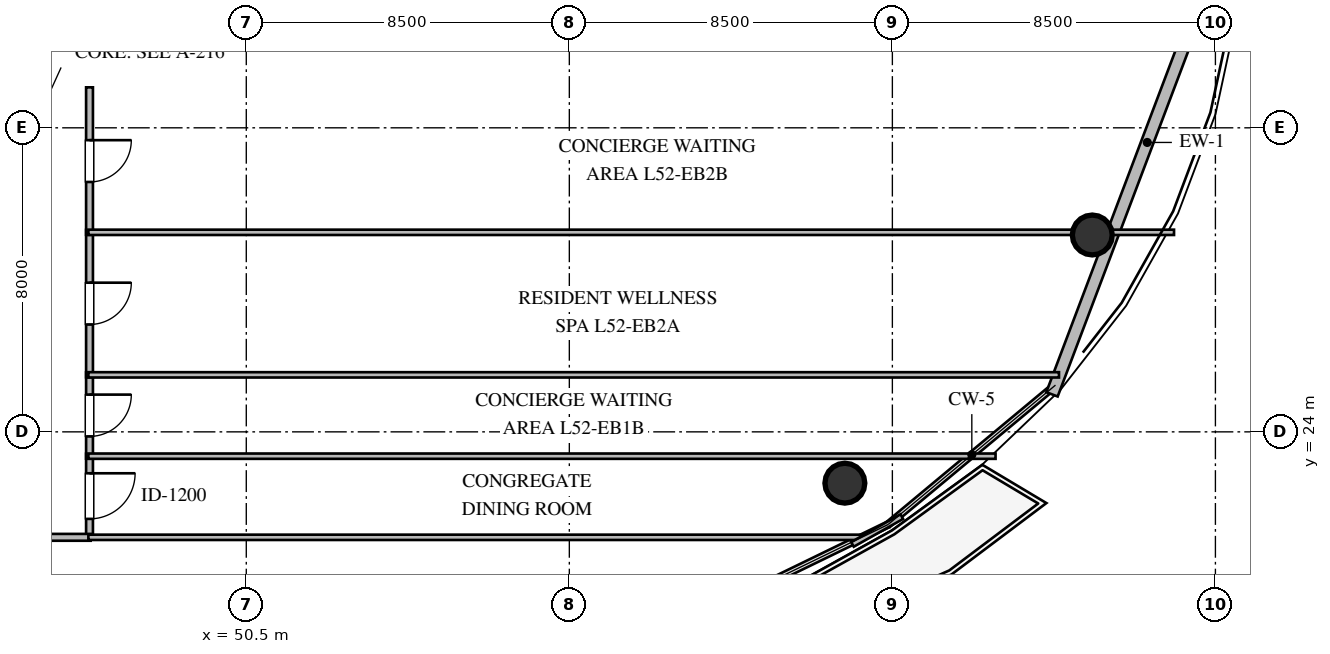
"""IFC4 building model, lengths in metres.
Left out: names, types, materials, properties, quantities, classifications, styles, units other than length and angle.
Written with IfcOpenShell. Run it as: python <this file> out.ifc"""

import sys

from ifc_helpers import new_model, si_unit, direction, frame, frame_2d, origin, origin_2d, place, context, subcontext, project, spatial, rectangle, circle, extrude, element, fill, save


model = new_model("IFC4")
c1 = context("Model", 3, precision=1e-05, world=origin(), true_north=direction((0.0, 1.0)))
c2 = subcontext(c1, "Body", "Model", "MODEL_VIEW")
j1 = project(units=[si_unit("LENGTHUNIT", "METRE"), si_unit("PLANEANGLEUNIT", "RADIAN")], contexts=[c1])
p1 = place(None, origin())
s1 = spatial("IfcSite", under=j1, at=p1, CompositionType="ELEMENT")
p2 = place(p1, origin())
s2 = spatial("IfcBuilding", under=s1, at=p2, CompositionType="ELEMENT")
p3 = place(p2, frame((0.0, 0.0, 199.2)))
s3 = spatial("IfcBuildingStorey", under=s2, at=p3, CompositionType="ELEMENT", Elevation=199.2)
for number, where, z_axis, x_axis in (
    (1, (66.25, 22.65, 0.0), (0.0, 0.0, 1.0), (1.0, 0.0, 0.0)),
    (2, (72.76, 29.18, 0.0), (0.0, 0.0, 1.0), (1.0, 0.0, 0.0)),
):
    element("IfcColumn", number, at=place(p3, frame(where, z_axis=z_axis, x_axis=x_axis)), inside=s3, PredefinedType="COLUMN", context=c2, shape_type="SweptSolid", body=[
        extrude(circle(Radius=0.525, at=origin_2d()), origin(), (0.0, 0.0, 1.0), 3.6),
    ])
p4 = place(p3, frame((76.712, 38.243, 0.0), z_axis=(0.0, 0.0, 1.0), x_axis=(-0.353659523244, -0.935374225441, 0.0)))
e3 = element("IfcWall", 3, at=p4, inside=s3, PredefinedType="STANDARD", context=c2, shape_type="SweptSolid", body=[
    extrude(rectangle(XDim=14.172, YDim=0.32, at=frame_2d((7.086, 0.0))), origin(), (0.0, 0.0, 1.0), 3.36),
])
p5 = place(p3, frame((46.375, 23.425, 0.0), z_axis=(0.0, 0.0, 1.0), x_axis=(0.0, -1.0, 0.0)))
e4 = element("IfcWall", 4, at=p5, inside=s3, PredefinedType="PARTITIONING", context=c2, shape_type="SweptSolid", body=[
    extrude(rectangle(XDim=2.23, YDim=0.18, at=frame_2d((1.115, 0.0))), origin(), (0.0, 0.0, 1.0), 3.36),
])
p6 = place(p5, frame((0.515, 0.0, 0.0)))
e5 = element("IfcOpeningElement", 5, at=p6, cuts=e4, PredefinedType="OPENING", context=c2, shape_type="SweptSolid", body=[
    extrude(rectangle(XDim=1.2, YDim=2.15, at=frame_2d((0.6, 1.075))), frame((0.0, 0.1, 0.0), z_axis=(0.0, -1.0, 0.0), x_axis=(1.0, 0.0, 0.0)), (0.0, 0.0, 1.0), 0.2),
])
p7 = place(p3, frame((46.375, 25.565, 0.0), z_axis=(0.0, 0.0, 1.0), x_axis=(0.0, -1.0, 0.0)))
e6 = element("IfcWall", 6, at=p7, inside=s3, PredefinedType="PARTITIONING", context=c2, shape_type="SweptSolid", body=[
    extrude(rectangle(XDim=2.27, YDim=0.18, at=frame_2d((1.135, 0.0))), origin(), (0.0, 0.0, 1.0), 3.36),
])
p8 = place(p7, frame((0.585, 0.0, 0.0)))
e7 = element("IfcOpeningElement", 7, at=p8, cuts=e6, PredefinedType="OPENING", context=c2, shape_type="SweptSolid", body=[
    extrude(rectangle(XDim=1.1, YDim=2.1, at=frame_2d((0.55, 1.05))), frame((0.0, 0.1, 0.0), z_axis=(0.0, -1.0, 0.0), x_axis=(1.0, 0.0, 0.0)), (0.0, 0.0, 1.0), 0.2),
])
p9 = place(p3, frame((46.375, 29.315, 0.0), z_axis=(0.0, 0.0, 1.0), x_axis=(0.0, -1.0, 0.0)))
e8 = element("IfcWall", 8, at=p9, inside=s3, PredefinedType="PARTITIONING", context=c2, shape_type="SweptSolid", body=[
    extrude(rectangle(XDim=3.88, YDim=0.18, at=frame_2d((1.94, 0.0))), origin(), (0.0, 0.0, 1.0), 3.36),
])
p10 = place(p9, frame((1.39, 0.0, 0.0)))
e9 = element("IfcOpeningElement", 9, at=p10, cuts=e8, PredefinedType="OPENING", context=c2, shape_type="SweptSolid", body=[
    extrude(rectangle(XDim=1.1, YDim=2.1, at=frame_2d((0.55, 1.05))), frame((0.0, 0.1, 0.0), z_axis=(0.0, -1.0, 0.0), x_axis=(1.0, 0.0, 0.0)), (0.0, 0.0, 1.0), 0.2),
])
p11 = place(p3, frame((46.375, 33.065, 0.0), z_axis=(0.0, 0.0, 1.0), x_axis=(0.0, -1.0, 0.0)))
e10 = element("IfcWall", 10, at=p11, inside=s3, PredefinedType="PARTITIONING", context=c2, shape_type="SweptSolid", body=[
    extrude(rectangle(XDim=3.88, YDim=0.18, at=frame_2d((1.94, 0.0))), origin(), (0.0, 0.0, 1.0), 3.36),
])
p12 = place(p11, frame((1.39, 0.0, 0.0)))
e11 = element("IfcOpeningElement", 11, at=p12, cuts=e10, PredefinedType="OPENING", context=c2, shape_type="SweptSolid", body=[
    extrude(rectangle(XDim=1.1, YDim=2.1, at=frame_2d((0.55, 1.05))), frame((0.0, 0.1, 0.0), z_axis=(0.0, -1.0, 0.0), x_axis=(1.0, 0.0, 0.0)), (0.0, 0.0, 1.0), 0.2),
])
p13 = place(p3, frame((46.405, 21.225, 0.0), z_axis=(0.0, 0.0, 1.0), x_axis=(-1.0, 0.0, 0.0)))
e12 = element("IfcWall", 12, at=p13, inside=s3, PredefinedType="PARTITIONING", context=c2, shape_type="SweptSolid", body=[
    extrude(rectangle(XDim=14.47, YDim=0.18, at=frame_2d((7.235, 0.0))), origin(), (0.0, 0.0, 1.0), 2.996),
])
p14 = place(p13, frame((6.635, 0.0, 0.0)))
e13 = element("IfcOpeningElement", 13, at=p14, cuts=e12, PredefinedType="OPENING", context=c2, shape_type="SweptSolid", body=[
    extrude(rectangle(XDim=1.2, YDim=2.15, at=frame_2d((0.6, 1.075))), frame((0.0, 0.1, 0.0), z_axis=(0.0, -1.0, 0.0), x_axis=(1.0, 0.0, 0.0)), (0.0, 0.0, 1.0), 0.2),
])
p15 = place(p3, frame((46.345, 23.36, 0.0), z_axis=(0.0, 0.0, 1.0), x_axis=(1.0, 0.0, 0.0)))
e14 = element("IfcWall", 14, at=p15, inside=s3, PredefinedType="PARTITIONING", context=c2, shape_type="SweptSolid", body=[
    extrude(rectangle(XDim=23.87, YDim=0.14, at=frame_2d((11.935, 0.0))), origin(), (0.0, 0.0, 1.0), 2.806),
])
p16 = place(p3, frame((66.684, 21.225, 0.0), z_axis=(0.0, 0.0, 1.0), x_axis=(-1.0, 0.0, 0.0)))
e15 = element("IfcWall", 15, at=p16, inside=s3, PredefinedType="PARTITIONING", context=c2, shape_type="SweptSolid", body=[
    extrude(rectangle(XDim=20.339, YDim=0.14, at=frame_2d((10.169, 0.0))), origin(), (0.0, 0.0, 1.0), 2.996),
])
p17 = place(p3, frame((67.748, 21.77, 0.0), z_axis=(0.0, 0.0, 1.0), x_axis=(-0.871352238731, -0.490658003153, 0.0)))
e16 = element("IfcWall", 16, at=p17, inside=s3, PredefinedType="PARTITIONING", context=c2, shape_type="SweptSolid", body=[
    extrude(rectangle(XDim=1.49, YDim=0.14, at=frame_2d((0.745, 0.0))), origin(), (0.0, 0.0, 1.0), 3.36),
])
p18 = place(p3, frame((46.345, 25.5, 0.0), z_axis=(0.0, 0.0, 1.0), x_axis=(1.0, 0.0, 0.0)))
e17 = element("IfcWall", 17, at=p18, inside=s3, PredefinedType="PARTITIONING", context=c2, shape_type="SweptSolid", body=[
    extrude(rectangle(XDim=25.539, YDim=0.14, at=frame_2d((12.77, 0.0))), origin(), (0.0, 0.0, 1.0), 2.806),
])
p19 = place(p3, frame((46.345, 29.25, 0.0), z_axis=(0.0, 0.0, 1.0), x_axis=(1.0, 0.0, 0.0)))
e18 = element("IfcWall", 18, at=p19, inside=s3, PredefinedType="PARTITIONING", context=c2, shape_type="SweptSolid", body=[
    extrude(rectangle(XDim=28.566, YDim=0.14, at=frame_2d((14.283, 0.0))), origin(), (0.0, 0.0, 1.0), 2.806),
])
p20 = place(p6, origin())
e19 = element("IfcDoor", 19, at=p20, inside=s3, OperationType="SINGLE_SWING_LEFT", PredefinedType="DOOR", context=c2, shape_type="SweptSolid", body=[
    extrude(rectangle(XDim=1.2, YDim=2.15, at=frame_2d((0.6, 1.075))), frame((0.0, 0.025, 0.0), z_axis=(0.0, -1.0, 0.0), x_axis=(1.0, 0.0, 0.0)), (0.0, 0.0, 1.0), 0.05),
])
fill(e5, e19)
p21 = place(p8, origin())
e20 = element("IfcDoor", 20, at=p21, inside=s3, OperationType="SINGLE_SWING_LEFT", PredefinedType="DOOR", context=c2, shape_type="SweptSolid", body=[
    extrude(rectangle(XDim=1.1, YDim=2.1, at=frame_2d((0.55, 1.05))), frame((0.0, 0.025, 0.0), z_axis=(0.0, -1.0, 0.0), x_axis=(1.0, 0.0, 0.0)), (0.0, 0.0, 1.0), 0.05),
])
fill(e7, e20)
p22 = place(p10, origin())
e21 = element("IfcDoor", 21, at=p22, inside=s3, OperationType="SINGLE_SWING_LEFT", PredefinedType="DOOR", context=c2, shape_type="SweptSolid", body=[
    extrude(rectangle(XDim=1.1, YDim=2.1, at=frame_2d((0.55, 1.05))), frame((0.0, 0.025, 0.0), z_axis=(0.0, -1.0, 0.0), x_axis=(1.0, 0.0, 0.0)), (0.0, 0.0, 1.0), 0.05),
])
fill(e9, e21)
p23 = place(p12, origin())
e22 = element("IfcDoor", 22, at=p23, inside=s3, OperationType="SINGLE_SWING_LEFT", PredefinedType="DOOR", context=c2, shape_type="SweptSolid", body=[
    extrude(rectangle(XDim=1.1, YDim=2.1, at=frame_2d((0.55, 1.05))), frame((0.0, 0.025, 0.0), z_axis=(0.0, -1.0, 0.0), x_axis=(1.0, 0.0, 0.0)), (0.0, 0.0, 1.0), 0.05),
])
fill(e11, e22)
save(model, sys.argv[1])
